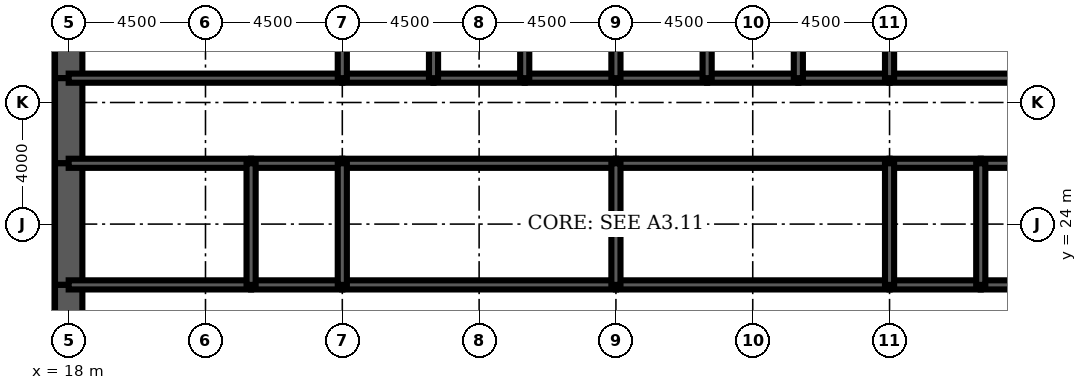
"""IFC4 building model, lengths in metres.
Left out: names, types, materials, properties, quantities, classifications, styles, units other than length and angle.
Written with IfcOpenShell. Run it as: python <this file> out.ifc"""

import sys

from ifc_helpers import new_model, si_unit, direction, frame, frame_2d, origin, place, context, subcontext, project, spatial, rectangle, extrude, element, fill, save


model = new_model("IFC4")
c1 = context("Model", 3, precision=1e-05, world=origin(), true_north=direction((0.0, 1.0)))
c2 = subcontext(c1, "Body", "Model", "MODEL_VIEW")
j1 = project(units=[si_unit("LENGTHUNIT", "METRE"), si_unit("PLANEANGLEUNIT", "RADIAN")], contexts=[c1])
p1 = place(None, origin())
s1 = spatial("IfcSite", under=j1, at=p1, CompositionType="ELEMENT")
p2 = place(p1, origin())
s2 = spatial("IfcBuilding", under=s1, at=p2, CompositionType="ELEMENT")
p3 = place(p2, frame((0.0, 0.0, 45.5)))
s3 = spatial("IfcBuildingStorey", under=s2, at=p3, CompositionType="ELEMENT", Elevation=45.5)
p4 = place(p3, frame((18.0, 32.0, 0.0), z_axis=(0.0, 0.0, 1.0), x_axis=(0.0, -1.0, 0.0)))
e1 = element("IfcWall", 1, at=p4, inside=s3, PredefinedType="SHEAR", context=c2, shape_type="SweptSolid", body=[
    extrude(rectangle(XDim=3.2, YDim=0.9, at=frame_2d((1.6, 0.0))), origin(), (0.0, 0.0, 1.0), 4.5),
])
p5 = place(p3, frame((18.0, 28.8, 0.0), z_axis=(0.0, 0.0, 1.0), x_axis=(0.0, -1.0, 0.0)))
e2 = element("IfcWall", 2, at=p5, inside=s3, PredefinedType="SHEAR", context=c2, shape_type="SweptSolid", body=[
    extrude(rectangle(XDim=2.8, YDim=0.9, at=frame_2d((1.4, 0.0))), origin(), (0.0, 0.0, 1.0), 4.5),
])
p6 = place(p5, frame((0.4, 0.0, 0.0)))
e3 = element("IfcOpeningElement", 3, at=p6, cuts=e2, PredefinedType="OPENING", context=c2, shape_type="SweptSolid", body=[
    extrude(rectangle(XDim=1.8, YDim=2.1, at=frame_2d((0.9, 1.05))), frame((0.0, 0.46, 0.0), z_axis=(0.0, -1.0, 0.0), x_axis=(1.0, 0.0, 0.0)), (0.0, 0.0, 1.0), 0.92),
])
p7 = place(p3, frame((18.0, 26.0, 0.0), z_axis=(0.0, 0.0, 1.0), x_axis=(0.0, -1.0, 0.0)))
e4 = element("IfcWall", 4, at=p7, inside=s3, PredefinedType="SHEAR", context=c2, shape_type="SweptSolid", body=[
    extrude(rectangle(XDim=4.0, YDim=0.9, at=frame_2d((2.0, 0.0))), origin(), (0.0, 0.0, 1.0), 4.5),
])
p8 = place(p3, frame((18.0, 22.0, 0.0), z_axis=(0.0, 0.0, 1.0), x_axis=(0.0, -1.0, 0.0)))
e5 = element("IfcWall", 5, at=p8, inside=s3, PredefinedType="SHEAR", context=c2, shape_type="SweptSolid", body=[
    extrude(rectangle(XDim=2.8, YDim=0.9, at=frame_2d((1.4, 0.0))), origin(), (0.0, 0.0, 1.0), 4.5),
])
p9 = place(p8, frame((0.6, 0.0, 0.0)))
e6 = element("IfcOpeningElement", 6, at=p9, cuts=e5, PredefinedType="OPENING", context=c2, shape_type="SweptSolid", body=[
    extrude(rectangle(XDim=1.8, YDim=2.1, at=frame_2d((0.9, 1.05))), frame((0.0, 0.46, 0.0), z_axis=(0.0, -1.0, 0.0), x_axis=(1.0, 0.0, 0.0)), (0.0, 0.0, 1.0), 0.92),
])
p10 = place(p3, frame((18.0, 28.8, 0.0), z_axis=(0.0, 0.0, 1.0), x_axis=(1.0, 0.0, 0.0)))
e7 = element("IfcWall", 7, at=p10, inside=s3, PredefinedType="SOLIDWALL", context=c2, shape_type="SweptSolid", body=[
    extrude(rectangle(XDim=9.0, YDim=0.3, at=frame_2d((4.5, 0.0))), origin(), (0.0, 0.0, 1.0), 4.5),
])
p11 = place(p10, frame((0.65, 0.0, 0.0)))
e8 = element("IfcOpeningElement", 8, at=p11, cuts=e7, PredefinedType="OPENING", context=c2, shape_type="SweptSolid", body=[
    extrude(rectangle(XDim=1.0, YDim=2.1, at=frame_2d((0.5, 1.05))), frame((0.0, 0.16, 0.0), z_axis=(0.0, -1.0, 0.0), x_axis=(1.0, 0.0, 0.0)), (0.0, 0.0, 1.0), 0.32),
])
p12 = place(p3, frame((27.0, 28.8, 0.0), z_axis=(0.0, 0.0, 1.0), x_axis=(1.0, 0.0, 0.0)))
e9 = element("IfcWall", 9, at=p12, inside=s3, PredefinedType="SOLIDWALL", context=c2, shape_type="SweptSolid", body=[
    extrude(rectangle(XDim=3.0, YDim=0.3, at=frame_2d((1.5, 0.0))), origin(), (0.0, 0.0, 1.0), 4.5),
])
p13 = place(p12, frame((0.95, 0.0, 0.0)))
e10 = element("IfcOpeningElement", 10, at=p13, cuts=e9, PredefinedType="OPENING", context=c2, shape_type="SweptSolid", body=[
    extrude(rectangle(XDim=1.1, YDim=2.2, at=frame_2d((0.55, 1.1))), frame((0.0, 0.16, 0.0), z_axis=(0.0, -1.0, 0.0), x_axis=(1.0, 0.0, 0.0)), (0.0, 0.0, 1.0), 0.32),
])
p14 = place(p3, frame((30.0, 28.8, 0.0), z_axis=(0.0, 0.0, 1.0), x_axis=(1.0, 0.0, 0.0)))
e11 = element("IfcWall", 11, at=p14, inside=s3, PredefinedType="SOLIDWALL", context=c2, shape_type="SweptSolid", body=[
    extrude(rectangle(XDim=3.0, YDim=0.3, at=frame_2d((1.5, 0.0))), origin(), (0.0, 0.0, 1.0), 4.5),
])
p15 = place(p14, frame((0.95, 0.0, 0.0)))
e12 = element("IfcOpeningElement", 12, at=p15, cuts=e11, PredefinedType="OPENING", context=c2, shape_type="SweptSolid", body=[
    extrude(rectangle(XDim=1.1, YDim=2.2, at=frame_2d((0.55, 1.1))), frame((0.0, 0.16, 0.0), z_axis=(0.0, -1.0, 0.0), x_axis=(1.0, 0.0, 0.0)), (0.0, 0.0, 1.0), 0.32),
])
p16 = place(p3, frame((33.0, 28.8, 0.0), z_axis=(0.0, 0.0, 1.0), x_axis=(1.0, 0.0, 0.0)))
e13 = element("IfcWall", 13, at=p16, inside=s3, PredefinedType="SOLIDWALL", context=c2, shape_type="SweptSolid", body=[
    extrude(rectangle(XDim=3.0, YDim=0.3, at=frame_2d((1.5, 0.0))), origin(), (0.0, 0.0, 1.0), 4.5),
])
p17 = place(p16, frame((0.95, 0.0, 0.0)))
e14 = element("IfcOpeningElement", 14, at=p17, cuts=e13, PredefinedType="OPENING", context=c2, shape_type="SweptSolid", body=[
    extrude(rectangle(XDim=1.1, YDim=2.2, at=frame_2d((0.55, 1.1))), frame((0.0, 0.16, 0.0), z_axis=(0.0, -1.0, 0.0), x_axis=(1.0, 0.0, 0.0)), (0.0, 0.0, 1.0), 0.32),
])
for number, where, z_axis, x_axis in (
    (15, (36.0, 28.8, 0.0), (0.0, 0.0, 1.0), (1.0, 0.0, 0.0)),
    (16, (39.0, 28.8, 0.0), (0.0, 0.0, 1.0), (1.0, 0.0, 0.0)),
):
    element("IfcWall", number, at=place(p3, frame(where, z_axis=z_axis, x_axis=x_axis)), inside=s3, PredefinedType="SOLIDWALL", context=c2, shape_type="SweptSolid", body=[
        extrude(rectangle(XDim=3.0, YDim=0.3, at=frame_2d((1.5, 0.0))), origin(), (0.0, 0.0, 1.0), 4.5),
    ])
p18 = place(p3, frame((42.0, 28.8, 0.0), z_axis=(0.0, 0.0, 1.0), x_axis=(1.0, 0.0, 0.0)))
e17 = element("IfcWall", 17, at=p18, inside=s3, PredefinedType="SOLIDWALL", context=c2, shape_type="SweptSolid", body=[
    extrude(rectangle(XDim=3.0, YDim=0.3, at=frame_2d((1.5, 0.0))), origin(), (0.0, 0.0, 1.0), 4.5),
])
p19 = place(p18, frame((0.95, 0.0, 0.0)))
e18 = element("IfcOpeningElement", 18, at=p19, cuts=e17, PredefinedType="OPENING", context=c2, shape_type="SweptSolid", body=[
    extrude(rectangle(XDim=1.1, YDim=2.2, at=frame_2d((0.55, 1.1))), frame((0.0, 0.16, 0.0), z_axis=(0.0, -1.0, 0.0), x_axis=(1.0, 0.0, 0.0)), (0.0, 0.0, 1.0), 0.32),
])
p20 = place(p3, frame((45.0, 28.8, 0.0), z_axis=(0.0, 0.0, 1.0), x_axis=(1.0, 0.0, 0.0)))
e19 = element("IfcWall", 19, at=p20, inside=s3, PredefinedType="SOLIDWALL", context=c2, shape_type="SweptSolid", body=[
    extrude(rectangle(XDim=9.0, YDim=0.3, at=frame_2d((4.5, 0.0))), origin(), (0.0, 0.0, 1.0), 4.5),
])
p21 = place(p20, frame((7.35, 0.0, 0.0)))
e20 = element("IfcOpeningElement", 20, at=p21, cuts=e19, PredefinedType="OPENING", context=c2, shape_type="SweptSolid", body=[
    extrude(rectangle(XDim=1.0, YDim=2.1, at=frame_2d((0.5, 1.05))), frame((0.0, 0.16, 0.0), z_axis=(0.0, -1.0, 0.0), x_axis=(1.0, 0.0, 0.0)), (0.0, 0.0, 1.0), 0.32),
])
p22 = place(p3, frame((18.0, 22.0, 0.0), z_axis=(0.0, 0.0, 1.0), x_axis=(1.0, 0.0, 0.0)))
e21 = element("IfcWall", 21, at=p22, inside=s3, PredefinedType="SOLIDWALL", context=c2, shape_type="SweptSolid", body=[
    extrude(rectangle(XDim=6.0, YDim=0.3, at=frame_2d((3.0, 0.0))), origin(), (0.0, 0.0, 1.0), 4.5),
])
p23 = place(p22, frame((4.4, 0.0, 0.0)))
e22 = element("IfcOpeningElement", 22, at=p23, cuts=e21, PredefinedType="OPENING", context=c2, shape_type="SweptSolid", body=[
    extrude(rectangle(XDim=1.0, YDim=2.1, at=frame_2d((0.5, 1.05))), frame((0.0, 0.16, 0.0), z_axis=(0.0, -1.0, 0.0), x_axis=(1.0, 0.0, 0.0)), (0.0, 0.0, 1.0), 0.32),
])
p24 = place(p22, frame((1.0, 0.0, 0.0)))
e23 = element("IfcOpeningElement", 23, at=p24, cuts=e21, PredefinedType="OPENING", context=c2, shape_type="SweptSolid", body=[
    extrude(rectangle(XDim=1.0, YDim=2.1, at=frame_2d((0.5, 1.05))), frame((0.0, 0.16, 0.0), z_axis=(0.0, -1.0, 0.0), x_axis=(1.0, 0.0, 0.0)), (0.0, 0.0, 1.0), 0.32),
])
p25 = place(p3, frame((24.0, 22.0, 0.0), z_axis=(0.0, 0.0, 1.0), x_axis=(1.0, 0.0, 0.0)))
e24 = element("IfcWall", 24, at=p25, inside=s3, PredefinedType="SOLIDWALL", context=c2, shape_type="SweptSolid", body=[
    extrude(rectangle(XDim=3.0, YDim=0.3, at=frame_2d((1.5, 0.0))), origin(), (0.0, 0.0, 1.0), 4.5),
])
p26 = place(p25, frame((1.0, 0.0, 0.0)))
e25 = element("IfcOpeningElement", 25, at=p26, cuts=e24, PredefinedType="OPENING", context=c2, shape_type="SweptSolid", body=[
    extrude(rectangle(XDim=1.0, YDim=2.1, at=frame_2d((0.5, 1.05))), frame((0.0, 0.16, 0.0), z_axis=(0.0, -1.0, 0.0), x_axis=(1.0, 0.0, 0.0)), (0.0, 0.0, 1.0), 0.32),
])
p27 = place(p3, frame((27.0, 22.0, 0.0), z_axis=(0.0, 0.0, 1.0), x_axis=(1.0, 0.0, 0.0)))
e26 = element("IfcWall", 26, at=p27, inside=s3, PredefinedType="SOLIDWALL", context=c2, shape_type="SweptSolid", body=[
    extrude(rectangle(XDim=9.0, YDim=0.3, at=frame_2d((4.5, 0.0))), origin(), (0.0, 0.0, 1.0), 4.5),
])
p28 = place(p27, frame((4.0, 0.0, 0.0)))
e27 = element("IfcOpeningElement", 27, at=p28, cuts=e26, PredefinedType="OPENING", context=c2, shape_type="SweptSolid", body=[
    extrude(rectangle(XDim=1.0, YDim=2.1, at=frame_2d((0.5, 1.05))), frame((0.0, 0.16, 0.0), z_axis=(0.0, -1.0, 0.0), x_axis=(1.0, 0.0, 0.0)), (0.0, 0.0, 1.0), 0.32),
])
p29 = place(p3, frame((36.0, 22.0, 0.0), z_axis=(0.0, 0.0, 1.0), x_axis=(1.0, 0.0, 0.0)))
e28 = element("IfcWall", 28, at=p29, inside=s3, PredefinedType="SOLIDWALL", context=c2, shape_type="SweptSolid", body=[
    extrude(rectangle(XDim=9.0, YDim=0.3, at=frame_2d((4.5, 0.0))), origin(), (0.0, 0.0, 1.0), 4.5),
])
p30 = place(p29, frame((4.0, 0.0, 0.0)))
e29 = element("IfcOpeningElement", 29, at=p30, cuts=e28, PredefinedType="OPENING", context=c2, shape_type="SweptSolid", body=[
    extrude(rectangle(XDim=1.0, YDim=2.1, at=frame_2d((0.5, 1.05))), frame((0.0, 0.16, 0.0), z_axis=(0.0, -1.0, 0.0), x_axis=(1.0, 0.0, 0.0)), (0.0, 0.0, 1.0), 0.32),
])
p31 = place(p3, frame((45.0, 22.0, 0.0), z_axis=(0.0, 0.0, 1.0), x_axis=(1.0, 0.0, 0.0)))
e30 = element("IfcWall", 30, at=p31, inside=s3, PredefinedType="SOLIDWALL", context=c2, shape_type="SweptSolid", body=[
    extrude(rectangle(XDim=3.0, YDim=0.3, at=frame_2d((1.5, 0.0))), origin(), (0.0, 0.0, 1.0), 4.5),
])
p32 = place(p31, frame((1.0, 0.0, 0.0)))
e31 = element("IfcOpeningElement", 31, at=p32, cuts=e30, PredefinedType="OPENING", context=c2, shape_type="SweptSolid", body=[
    extrude(rectangle(XDim=1.0, YDim=2.1, at=frame_2d((0.5, 1.05))), frame((0.0, 0.16, 0.0), z_axis=(0.0, -1.0, 0.0), x_axis=(1.0, 0.0, 0.0)), (0.0, 0.0, 1.0), 0.32),
])
p33 = place(p3, frame((48.0, 22.0, 0.0), z_axis=(0.0, 0.0, 1.0), x_axis=(1.0, 0.0, 0.0)))
e32 = element("IfcWall", 32, at=p33, inside=s3, PredefinedType="SOLIDWALL", context=c2, shape_type="SweptSolid", body=[
    extrude(rectangle(XDim=6.0, YDim=0.3, at=frame_2d((3.0, 0.0))), origin(), (0.0, 0.0, 1.0), 4.5),
])
p34 = place(p33, frame((2.0, 0.0, 0.0)))
e33 = element("IfcOpeningElement", 33, at=p34, cuts=e32, PredefinedType="OPENING", context=c2, shape_type="SweptSolid", body=[
    extrude(rectangle(XDim=1.0, YDim=2.1, at=frame_2d((0.5, 1.05))), frame((0.0, 0.16, 0.0), z_axis=(0.0, -1.0, 0.0), x_axis=(1.0, 0.0, 0.0)), (0.0, 0.0, 1.0), 0.32),
])
p35 = place(p33, frame((4.0, 0.0, 0.0)))
e34 = element("IfcOpeningElement", 34, at=p35, cuts=e32, PredefinedType="OPENING", context=c2, shape_type="SweptSolid", body=[
    extrude(rectangle(XDim=1.0, YDim=2.1, at=frame_2d((0.5, 1.05))), frame((0.0, 0.16, 0.0), z_axis=(0.0, -1.0, 0.0), x_axis=(1.0, 0.0, 0.0)), (0.0, 0.0, 1.0), 0.32),
])
p36 = place(p3, frame((18.0, 26.0, 0.0), z_axis=(0.0, 0.0, 1.0), x_axis=(1.0, 0.0, 0.0)))
e35 = element("IfcWall", 35, at=p36, inside=s3, PredefinedType="SOLIDWALL", context=c2, shape_type="SweptSolid", body=[
    extrude(rectangle(XDim=6.0, YDim=0.3, at=frame_2d((3.0, 0.0))), origin(), (0.0, 0.0, 1.0), 4.5),
])
p37 = place(p3, frame((24.0, 26.0, 0.0), z_axis=(0.0, 0.0, 1.0), x_axis=(1.0, 0.0, 0.0)))
e36 = element("IfcWall", 36, at=p37, inside=s3, PredefinedType="SOLIDWALL", context=c2, shape_type="SweptSolid", body=[
    extrude(rectangle(XDim=3.0, YDim=0.3, at=frame_2d((1.5, 0.0))), origin(), (0.0, 0.0, 1.0), 4.5),
])
for number, where, z_axis, x_axis in (
    (37, (27.0, 26.0, 0.0), (0.0, 0.0, 1.0), (1.0, 0.0, 0.0)),
    (38, (36.0, 26.0, 0.0), (0.0, 0.0, 1.0), (1.0, 0.0, 0.0)),
):
    element("IfcWall", number, at=place(p3, frame(where, z_axis=z_axis, x_axis=x_axis)), inside=s3, PredefinedType="SOLIDWALL", context=c2, shape_type="SweptSolid", body=[
        extrude(rectangle(XDim=9.0, YDim=0.3, at=frame_2d((4.5, 0.0))), origin(), (0.0, 0.0, 1.0), 4.5),
    ])
p38 = place(p3, frame((45.0, 26.0, 0.0), z_axis=(0.0, 0.0, 1.0), x_axis=(1.0, 0.0, 0.0)))
e39 = element("IfcWall", 39, at=p38, inside=s3, PredefinedType="SOLIDWALL", context=c2, shape_type="SweptSolid", body=[
    extrude(rectangle(XDim=3.0, YDim=0.3, at=frame_2d((1.5, 0.0))), origin(), (0.0, 0.0, 1.0), 4.5),
])
p39 = place(p3, frame((48.0, 26.0, 0.0), z_axis=(0.0, 0.0, 1.0), x_axis=(1.0, 0.0, 0.0)))
e40 = element("IfcWall", 40, at=p39, inside=s3, PredefinedType="SOLIDWALL", context=c2, shape_type="SweptSolid", body=[
    extrude(rectangle(XDim=6.0, YDim=0.3, at=frame_2d((3.0, 0.0))), origin(), (0.0, 0.0, 1.0), 4.5),
])
for number, where, z_axis, x_axis in (
    (41, (27.0, 28.8, 0.0), (0.0, 0.0, 1.0), (0.0, 1.0, 0.0)),
    (42, (30.0, 28.8, 0.0), (0.0, 0.0, 1.0), (0.0, 1.0, 0.0)),
    (43, (33.0, 28.8, 0.0), (0.0, 0.0, 1.0), (0.0, 1.0, 0.0)),
    (44, (36.0, 28.8, 0.0), (0.0, 0.0, 1.0), (0.0, 1.0, 0.0)),
    (45, (39.0, 28.8, 0.0), (0.0, 0.0, 1.0), (0.0, 1.0, 0.0)),
    (46, (42.0, 28.8, 0.0), (0.0, 0.0, 1.0), (0.0, 1.0, 0.0)),
    (47, (45.0, 28.8, 0.0), (0.0, 0.0, 1.0), (0.0, 1.0, 0.0)),
):
    element("IfcWall", number, at=place(p3, frame(where, z_axis=z_axis, x_axis=x_axis)), inside=s3, PredefinedType="SOLIDWALL", context=c2, shape_type="SweptSolid", body=[
        extrude(rectangle(XDim=3.2, YDim=0.3, at=frame_2d((1.6, 0.0))), origin(), (0.0, 0.0, 1.0), 4.5),
    ])
for number, where, z_axis, x_axis in (
    (48, (24.0, 22.0, 0.0), (0.0, 0.0, 1.0), (0.0, 1.0, 0.0)),
    (49, (27.0, 22.0, 0.0), (0.0, 0.0, 1.0), (0.0, 1.0, 0.0)),
    (50, (36.0, 22.0, 0.0), (0.0, 0.0, 1.0), (0.0, 1.0, 0.0)),
    (51, (45.0, 22.0, 0.0), (0.0, 0.0, 1.0), (0.0, 1.0, 0.0)),
    (52, (48.0, 22.0, 0.0), (0.0, 0.0, 1.0), (0.0, 1.0, 0.0)),
):
    element("IfcWall", number, at=place(p3, frame(where, z_axis=z_axis, x_axis=x_axis)), inside=s3, PredefinedType="SOLIDWALL", context=c2, shape_type="SweptSolid", body=[
        extrude(rectangle(XDim=4.0, YDim=0.3, at=frame_2d((2.0, 0.0))), origin(), (0.0, 0.0, 1.0), 4.5),
    ])
p40 = place(p3, frame((42.5, 22.15, 0.0), z_axis=(0.0, 0.0, 1.0), x_axis=(0.0, 1.0, 0.0)))
e53 = element("IfcWall", 53, at=p40, inside=s3, PredefinedType="PARTITIONING", context=c2, shape_type="SweptSolid", body=[
    extrude(rectangle(XDim=3.7, YDim=0.15, at=frame_2d((1.85, 0.0))), origin(), (0.0, 0.0, 1.0), 3.0),
])
p41 = place(p40, frame((2.2, 0.0, 0.0)))
e54 = element("IfcOpeningElement", 54, at=p41, cuts=e53, PredefinedType="OPENING", context=c2, shape_type="SweptSolid", body=[
    extrude(rectangle(XDim=1.0, YDim=2.1, at=frame_2d((0.5, 1.05))), frame((0.0, 0.085, 0.0), z_axis=(0.0, -1.0, 0.0), x_axis=(1.0, 0.0, 0.0)), (0.0, 0.0, 1.0), 0.17),
])
p42 = place(p3, frame((20.625, 22.15, 0.0), z_axis=(0.0, 0.0, 1.0), x_axis=(0.0, 1.0, 0.0)))
e55 = element("IfcWall", 55, at=p42, inside=s3, PredefinedType="PARTITIONING", context=c2, shape_type="SweptSolid", body=[
    extrude(rectangle(XDim=3.7, YDim=0.15, at=frame_2d((1.85, 0.0))), origin(), (0.0, 0.0, 1.0), 3.0),
])
p43 = place(p3, frame((25.2, 26.15, 0.0), z_axis=(0.0, 0.0, 1.0), x_axis=(0.0, 1.0, 0.0)))
e56 = element("IfcWall", 56, at=p43, inside=s3, PredefinedType="PARTITIONING", context=c2, shape_type="SweptSolid", body=[
    extrude(rectangle(XDim=2.5, YDim=0.15, at=frame_2d((1.25, 0.0))), origin(), (0.0, 0.0, 1.0), 3.0),
])
p44 = place(p43, frame((0.35, 0.0, 0.0)))
e57 = element("IfcOpeningElement", 57, at=p44, cuts=e56, PredefinedType="OPENING", context=c2, shape_type="SweptSolid", body=[
    extrude(rectangle(XDim=1.0, YDim=2.1, at=frame_2d((0.5, 1.05))), frame((0.0, 0.085, 0.0), z_axis=(0.0, -1.0, 0.0), x_axis=(1.0, 0.0, 0.0)), (0.0, 0.0, 1.0), 0.17),
])
p45 = place(p41, origin())
e58 = element("IfcDoor", 58, at=p45, inside=s3, OperationType="SINGLE_SWING_RIGHT", PredefinedType="DOOR", context=c2, shape_type="SweptSolid", body=[
    extrude(rectangle(XDim=1.0, YDim=2.1, at=frame_2d((0.5, 1.05))), frame((0.0, 0.025, 0.0), z_axis=(0.0, -1.0, 0.0), x_axis=(1.0, 0.0, 0.0)), (0.0, 0.0, 1.0), 0.05),
])
fill(e54, e58)
p46 = place(p44, origin())
e59 = element("IfcDoor", 59, at=p46, inside=s3, OperationType="SINGLE_SWING_LEFT", PredefinedType="DOOR", context=c2, shape_type="SweptSolid", body=[
    extrude(rectangle(XDim=1.0, YDim=2.1, at=frame_2d((0.5, 1.05))), frame((0.0, 0.025, 0.0), z_axis=(0.0, -1.0, 0.0), x_axis=(1.0, 0.0, 0.0)), (0.0, 0.0, 1.0), 0.05),
])
fill(e57, e59)
p47 = place(p19, origin())
e60 = element("IfcDoor", 60, at=p47, inside=s3, OperationType="DOUBLE_DOOR_SLIDING", PredefinedType="USERDEFINED", context=c2, shape_type="SweptSolid", body=[
    extrude(rectangle(XDim=1.1, YDim=2.2, at=frame_2d((0.55, 1.1))), frame((0.0, 0.025, 0.0), z_axis=(0.0, -1.0, 0.0), x_axis=(1.0, 0.0, 0.0)), (0.0, 0.0, 1.0), 0.05),
])
fill(e18, e60)
p48 = place(p13, origin())
e61 = element("IfcDoor", 61, at=p48, inside=s3, OperationType="DOUBLE_DOOR_SLIDING", PredefinedType="USERDEFINED", context=c2, shape_type="SweptSolid", body=[
    extrude(rectangle(XDim=1.1, YDim=2.2, at=frame_2d((0.55, 1.1))), frame((0.0, 0.025, 0.0), z_axis=(0.0, -1.0, 0.0), x_axis=(1.0, 0.0, 0.0)), (0.0, 0.0, 1.0), 0.05),
])
fill(e10, e61)
p49 = place(p15, origin())
e62 = element("IfcDoor", 62, at=p49, inside=s3, OperationType="DOUBLE_DOOR_SLIDING", PredefinedType="USERDEFINED", context=c2, shape_type="SweptSolid", body=[
    extrude(rectangle(XDim=1.1, YDim=2.2, at=frame_2d((0.55, 1.1))), frame((0.0, 0.025, 0.0), z_axis=(0.0, -1.0, 0.0), x_axis=(1.0, 0.0, 0.0)), (0.0, 0.0, 1.0), 0.05),
])
fill(e12, e62)
p50 = place(p17, origin())
e63 = element("IfcDoor", 63, at=p50, inside=s3, OperationType="DOUBLE_DOOR_SLIDING", PredefinedType="USERDEFINED", context=c2, shape_type="SweptSolid", body=[
    extrude(rectangle(XDim=1.1, YDim=2.2, at=frame_2d((0.55, 1.1))), frame((0.0, 0.025, 0.0), z_axis=(0.0, -1.0, 0.0), x_axis=(1.0, 0.0, 0.0)), (0.0, 0.0, 1.0), 0.05),
])
fill(e14, e63)
p51 = place(p11, origin())
e64 = element("IfcDoor", 64, at=p51, inside=s3, OperationType="SINGLE_SWING_LEFT", PredefinedType="DOOR", context=c2, shape_type="SweptSolid", body=[
    extrude(rectangle(XDim=1.0, YDim=2.1, at=frame_2d((0.5, 1.05))), frame((0.0, 0.025, 0.0), z_axis=(0.0, -1.0, 0.0), x_axis=(1.0, 0.0, 0.0)), (0.0, 0.0, 1.0), 0.05),
])
fill(e8, e64)
p52 = place(p9, origin())
e65 = element("IfcDoor", 65, at=p52, inside=s3, OperationType="SINGLE_SWING_LEFT", PredefinedType="DOOR", context=c2, shape_type="SweptSolid", body=[
    extrude(rectangle(XDim=1.8, YDim=2.1, at=frame_2d((0.9, 1.05))), frame((0.0, 0.45, 0.0), z_axis=(0.0, -1.0, 0.0), x_axis=(1.0, 0.0, 0.0)), (0.0, 0.0, 1.0), 0.899),
])
fill(e6, e65)
p53 = place(p6, origin())
e66 = element("IfcDoor", 66, at=p53, inside=s3, OperationType="SINGLE_SWING_LEFT", PredefinedType="DOOR", context=c2, shape_type="SweptSolid", body=[
    extrude(rectangle(XDim=1.8, YDim=2.1, at=frame_2d((0.9, 1.05))), frame((0.0, 0.45, 0.0), z_axis=(0.0, -1.0, 0.0), x_axis=(1.0, 0.0, 0.0)), (0.0, 0.0, 1.0), 0.899),
])
fill(e3, e66)
p54 = place(p23, origin())
e67 = element("IfcDoor", 67, at=p54, inside=s3, OperationType="SINGLE_SWING_RIGHT", PredefinedType="DOOR", context=c2, shape_type="SweptSolid", body=[
    extrude(rectangle(XDim=1.0, YDim=2.1, at=frame_2d((0.5, 1.05))), frame((0.0, 0.025, 0.0), z_axis=(0.0, -1.0, 0.0), x_axis=(1.0, 0.0, 0.0)), (0.0, 0.0, 1.0), 0.05),
])
fill(e22, e67)
p55 = place(p26, origin())
e68 = element("IfcDoor", 68, at=p55, inside=s3, OperationType="SINGLE_SWING_LEFT", PredefinedType="DOOR", context=c2, shape_type="SweptSolid", body=[
    extrude(rectangle(XDim=1.0, YDim=2.1, at=frame_2d((0.5, 1.05))), frame((0.0, 0.025, 0.0), z_axis=(0.0, -1.0, 0.0), x_axis=(1.0, 0.0, 0.0)), (0.0, 0.0, 1.0), 0.05),
])
fill(e25, e68)
p56 = place(p28, origin())
e69 = element("IfcDoor", 69, at=p56, inside=s3, OperationType="SINGLE_SWING_LEFT", PredefinedType="DOOR", context=c2, shape_type="SweptSolid", body=[
    extrude(rectangle(XDim=1.0, YDim=2.1, at=frame_2d((0.5, 1.05))), frame((0.0, 0.025, 0.0), z_axis=(0.0, -1.0, 0.0), x_axis=(1.0, 0.0, 0.0)), (0.0, 0.0, 1.0), 0.05),
])
fill(e27, e69)
p57 = place(p30, origin())
e70 = element("IfcDoor", 70, at=p57, inside=s3, OperationType="SINGLE_SWING_LEFT", PredefinedType="DOOR", context=c2, shape_type="SweptSolid", body=[
    extrude(rectangle(XDim=1.0, YDim=2.1, at=frame_2d((0.5, 1.05))), frame((0.0, 0.025, 0.0), z_axis=(0.0, -1.0, 0.0), x_axis=(1.0, 0.0, 0.0)), (0.0, 0.0, 1.0), 0.05),
])
fill(e29, e70)
p58 = place(p32, origin())
e71 = element("IfcDoor", 71, at=p58, inside=s3, OperationType="SINGLE_SWING_LEFT", PredefinedType="DOOR", context=c2, shape_type="SweptSolid", body=[
    extrude(rectangle(XDim=1.0, YDim=2.1, at=frame_2d((0.5, 1.05))), frame((0.0, 0.025, 0.0), z_axis=(0.0, -1.0, 0.0), x_axis=(1.0, 0.0, 0.0)), (0.0, 0.0, 1.0), 0.05),
])
fill(e31, e71)
p59 = place(p24, origin())
e72 = element("IfcDoor", 72, at=p59, inside=s3, OperationType="SINGLE_SWING_LEFT", PredefinedType="DOOR", context=c2, shape_type="SweptSolid", body=[
    extrude(rectangle(XDim=1.0, YDim=2.1, at=frame_2d((0.5, 1.05))), frame((0.0, 0.025, 0.0), z_axis=(0.0, -1.0, 0.0), x_axis=(1.0, 0.0, 0.0)), (0.0, 0.0, 1.0), 0.05),
])
fill(e23, e72)
save(model, sys.argv[1])
